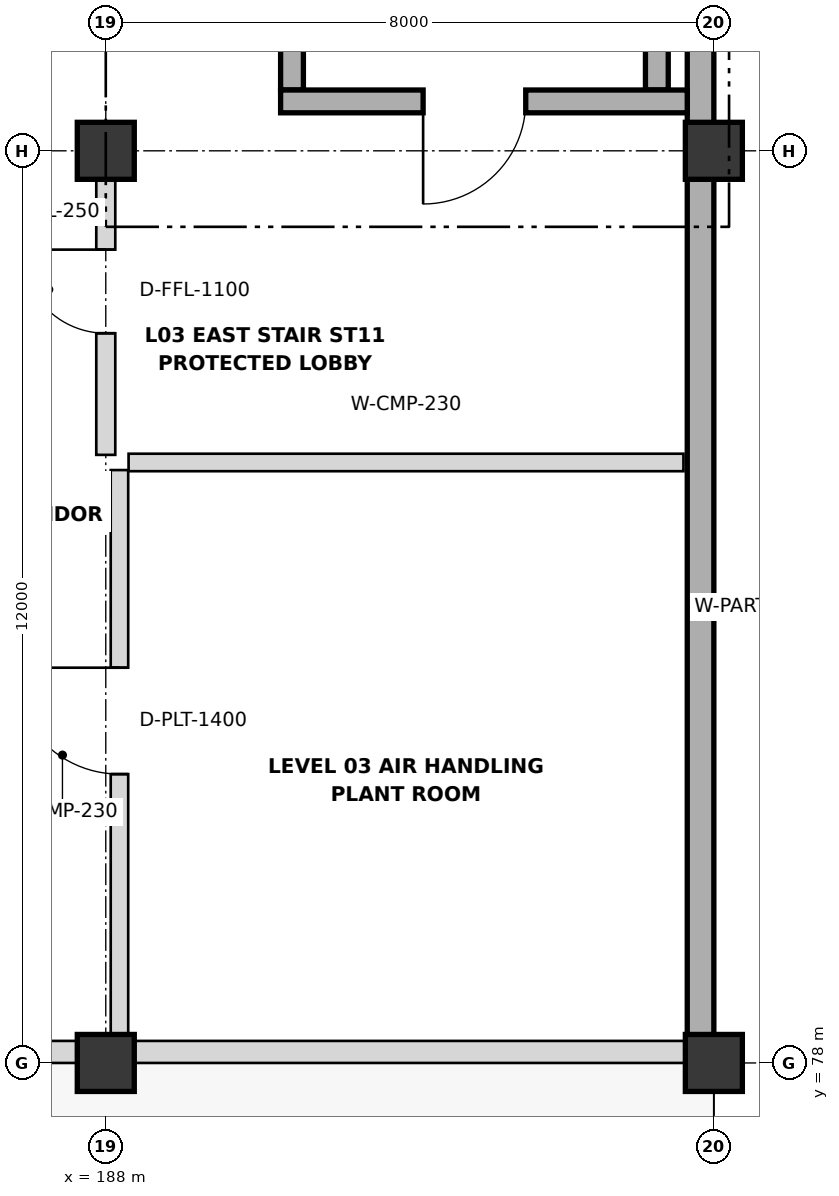
"""IFC4 building model, lengths in metres.
Left out: names, types, materials, properties, quantities, classifications, styles, units other than length and angle.
Written with IfcOpenShell. Run it as: python <this file> out.ifc"""

import sys

from ifc_helpers import new_model, si_unit, direction, frame, frame_2d, origin, origin_2d, place, context, subcontext, project, spatial, rectangle, extrude, element, fill, save


model = new_model("IFC4")
c1 = context("Model", 3, precision=1e-05, world=origin(), true_north=direction((0.0, 1.0)))
c2 = subcontext(c1, "Body", "Model", "MODEL_VIEW")
j1 = project(units=[si_unit("LENGTHUNIT", "METRE"), si_unit("PLANEANGLEUNIT", "RADIAN")], contexts=[c1])
p1 = place(None, origin())
s1 = spatial("IfcSite", under=j1, at=p1, CompositionType="ELEMENT")
p2 = place(p1, origin())
s2 = spatial("IfcBuilding", under=s1, at=p2, CompositionType="ELEMENT")
p3 = place(p2, frame((0.0, 0.0, 14.4)))
s3 = spatial("IfcBuildingStorey", under=s2, at=p3, CompositionType="ELEMENT", Elevation=14.4)
for number, where, z_axis, x_axis in (
    (1, (188.0, 78.0, 0.0), (0.0, 0.0, 1.0), (1.0, 0.0, 0.0)),
    (2, (188.0, 90.0, 0.0), (0.0, 0.0, 1.0), (1.0, 0.0, 0.0)),
    (3, (196.0, 78.0, 0.0), (0.0, 0.0, 1.0), (1.0, 0.0, 0.0)),
    (4, (196.0, 90.0, 0.0), (0.0, 0.0, 1.0), (1.0, 0.0, 0.0)),
):
    element("IfcColumn", number, at=place(p3, frame(where, z_axis=z_axis, x_axis=x_axis)), inside=s3, PredefinedType="COLUMN", context=c2, shape_type="SweptSolid", body=[
        extrude(rectangle(XDim=0.75, YDim=0.75, at=origin_2d()), origin(), (0.0, 0.0, 1.0), 4.2),
    ])
for number, where, z_axis, x_axis in (
    (5, (195.825, 89.63, 0.0), (0.0, 0.0, 1.0), (0.0, -1.0, 0.0)),
    (6, (195.825, 101.63, 0.0), (0.0, 0.0, 1.0), (0.0, -1.0, 0.0)),
):
    element("IfcWall", number, at=place(p3, frame(where, z_axis=z_axis, x_axis=x_axis)), inside=s3, PredefinedType="SOLIDWALL", context=c2, shape_type="SweptSolid", body=[
        extrude(rectangle(XDim=11.26, YDim=0.35, at=frame_2d((5.63, 0.0))), origin(), (0.0, 0.0, 1.0), 4.2),
    ])
p4 = place(p3, frame((187.63, 78.145, 0.0), z_axis=(0.0, 0.0, 1.0), x_axis=(-1.0, 0.0, 0.0)))
e7 = element("IfcWall", 7, at=p4, inside=s3, PredefinedType="SOLIDWALL", context=c2, shape_type="SweptSolid", body=[
    extrude(rectangle(XDim=9.26, YDim=0.29, at=frame_2d((4.63, 0.0))), origin(), (0.0, 0.0, 1.0), 3.078),
])
p5 = place(p4, frame((5.63, 0.0, 0.0)))
e8 = element("IfcOpeningElement", 8, at=p5, cuts=e7, PredefinedType="OPENING", context=c2, shape_type="SweptSolid", body=[
    extrude(rectangle(XDim=1.6, YDim=2.2, at=frame_2d((0.8, 1.1))), frame((0.0, 0.155, 0.0), z_axis=(0.0, -1.0, 0.0), x_axis=(1.0, 0.0, 0.0)), (0.0, 0.0, 1.0), 0.31),
])
p6 = place(p3, frame((195.63, 78.145, 0.0), z_axis=(0.0, 0.0, 1.0), x_axis=(-1.0, 0.0, 0.0)))
e9 = element("IfcWall", 9, at=p6, inside=s3, PredefinedType="SOLIDWALL", context=c2, shape_type="SweptSolid", body=[
    extrude(rectangle(XDim=7.26, YDim=0.29, at=frame_2d((3.63, 0.0))), origin(), (0.0, 0.0, 1.0), 3.078),
])
for number, where, z_axis, x_axis in (
    (10, (190.45, 90.8, 0.0), (0.0, 0.0, 1.0), (0.0, 1.0, 0.0)),
    (11, (195.25, 99.4, 0.0), (0.0, 0.0, 1.0), (0.0, -1.0, 0.0)),
):
    element("IfcWall", number, at=place(p3, frame(where, z_axis=z_axis, x_axis=x_axis)), inside=s3, PredefinedType="SHEAR", context=c2, shape_type="SweptSolid", body=[
        extrude(rectangle(XDim=8.6, YDim=0.3, at=frame_2d((4.3, 0.0))), origin(), (0.0, 0.0, 1.0), 4.2),
    ])
p7 = place(p3, frame((195.65, 90.65, 0.0), z_axis=(0.0, 0.0, 1.0), x_axis=(-1.0, 0.0, 0.0)))
e12 = element("IfcWall", 12, at=p7, inside=s3, PredefinedType="SHEAR", context=c2, shape_type="SweptSolid", body=[
    extrude(rectangle(XDim=5.35, YDim=0.3, at=frame_2d((2.675, 0.0))), origin(), (0.0, 0.0, 1.0), 4.2),
])
p8 = place(p7, frame((2.125, 0.0, 0.0)))
e13 = element("IfcOpeningElement", 13, at=p8, cuts=e12, PredefinedType="OPENING", context=c2, shape_type="SweptSolid", body=[
    extrude(rectangle(XDim=1.35, YDim=2.15, at=frame_2d((0.675, 1.075))), frame((0.0, 0.16, 0.0), z_axis=(0.0, -1.0, 0.0), x_axis=(1.0, 0.0, 0.0)), (0.0, 0.0, 1.0), 0.32),
])
p9 = place(p3, frame((188.0, 86.0, 0.0), z_axis=(0.0, 0.0, 1.0), x_axis=(0.0, 1.0, 0.0)))
e14 = element("IfcWall", 14, at=p9, inside=s3, PredefinedType="PARTITIONING", context=c2, shape_type="SweptSolid", body=[
    extrude(rectangle(XDim=4.35, YDim=0.25, at=frame_2d((2.175, 0.0))), origin(), (0.0, 0.0, 1.0), 3.078),
])
p10 = place(p9, frame((1.6, 0.0, 0.0)))
e15 = element("IfcOpeningElement", 15, at=p10, cuts=e14, PredefinedType="OPENING", context=c2, shape_type="SweptSolid", body=[
    extrude(rectangle(XDim=1.1, YDim=2.15, at=frame_2d((0.55, 1.075))), frame((0.0, 0.135, 0.0), z_axis=(0.0, -1.0, 0.0), x_axis=(1.0, 0.0, 0.0)), (0.0, 0.0, 1.0), 0.27),
])
p11 = place(p3, frame((188.18, 78.3, 0.0), z_axis=(0.0, 0.0, 1.0), x_axis=(0.0, 1.0, 0.0)))
e16 = element("IfcWall", 16, at=p11, inside=s3, PredefinedType="PARTITIONING", context=c2, shape_type="SweptSolid", body=[
    extrude(rectangle(XDim=7.5, YDim=0.23, at=frame_2d((3.75, 0.0))), origin(), (0.0, 0.0, 1.0), 3.078),
])
p12 = place(p11, frame((3.5, 0.0, 0.0)))
e17 = element("IfcOpeningElement", 17, at=p12, cuts=e16, PredefinedType="OPENING", context=c2, shape_type="SweptSolid", body=[
    extrude(rectangle(XDim=1.4, YDim=2.2, at=frame_2d((0.7, 1.1))), frame((0.0, 0.125, 0.0), z_axis=(0.0, -1.0, 0.0), x_axis=(1.0, 0.0, 0.0)), (0.0, 0.0, 1.0), 0.25),
])
p13 = place(p3, frame((188.3, 85.9, 0.0), z_axis=(0.0, 0.0, 1.0), x_axis=(1.0, 0.0, 0.0)))
e18 = element("IfcWall", 18, at=p13, inside=s3, PredefinedType="PARTITIONING", context=c2, shape_type="SweptSolid", body=[
    extrude(rectangle(XDim=7.3, YDim=0.23, at=frame_2d((3.65, 0.0))), origin(), (0.0, 0.0, 1.0), 3.178),
])
p14 = place(p8, origin())
e19 = element("IfcDoor", 19, at=p14, inside=s3, OperationType="SINGLE_SWING_RIGHT", PredefinedType="DOOR", context=c2, shape_type="SweptSolid", body=[
    extrude(rectangle(XDim=1.35, YDim=2.15, at=frame_2d((0.675, 1.075))), frame((0.0, 0.025, 0.0), z_axis=(0.0, -1.0, 0.0), x_axis=(1.0, 0.0, 0.0)), (0.0, 0.0, 1.0), 0.05),
])
fill(e13, e19)
p15 = place(p10, origin())
e20 = element("IfcDoor", 20, at=p15, inside=s3, OperationType="SINGLE_SWING_RIGHT", PredefinedType="DOOR", context=c2, shape_type="SweptSolid", body=[
    extrude(rectangle(XDim=1.1, YDim=2.15, at=frame_2d((0.55, 1.075))), frame((0.0, 0.025, 0.0), z_axis=(0.0, -1.0, 0.0), x_axis=(1.0, 0.0, 0.0)), (0.0, 0.0, 1.0), 0.05),
])
fill(e15, e20)
p16 = place(p12, origin())
e21 = element("IfcDoor", 21, at=p16, inside=s3, OperationType="SINGLE_SWING_RIGHT", PredefinedType="DOOR", context=c2, shape_type="SweptSolid", body=[
    extrude(rectangle(XDim=1.4, YDim=2.2, at=frame_2d((0.7, 1.1))), frame((0.0, 0.025, 0.0), z_axis=(0.0, -1.0, 0.0), x_axis=(1.0, 0.0, 0.0)), (0.0, 0.0, 1.0), 0.05),
])
fill(e17, e21)
save(model, sys.argv[1])
